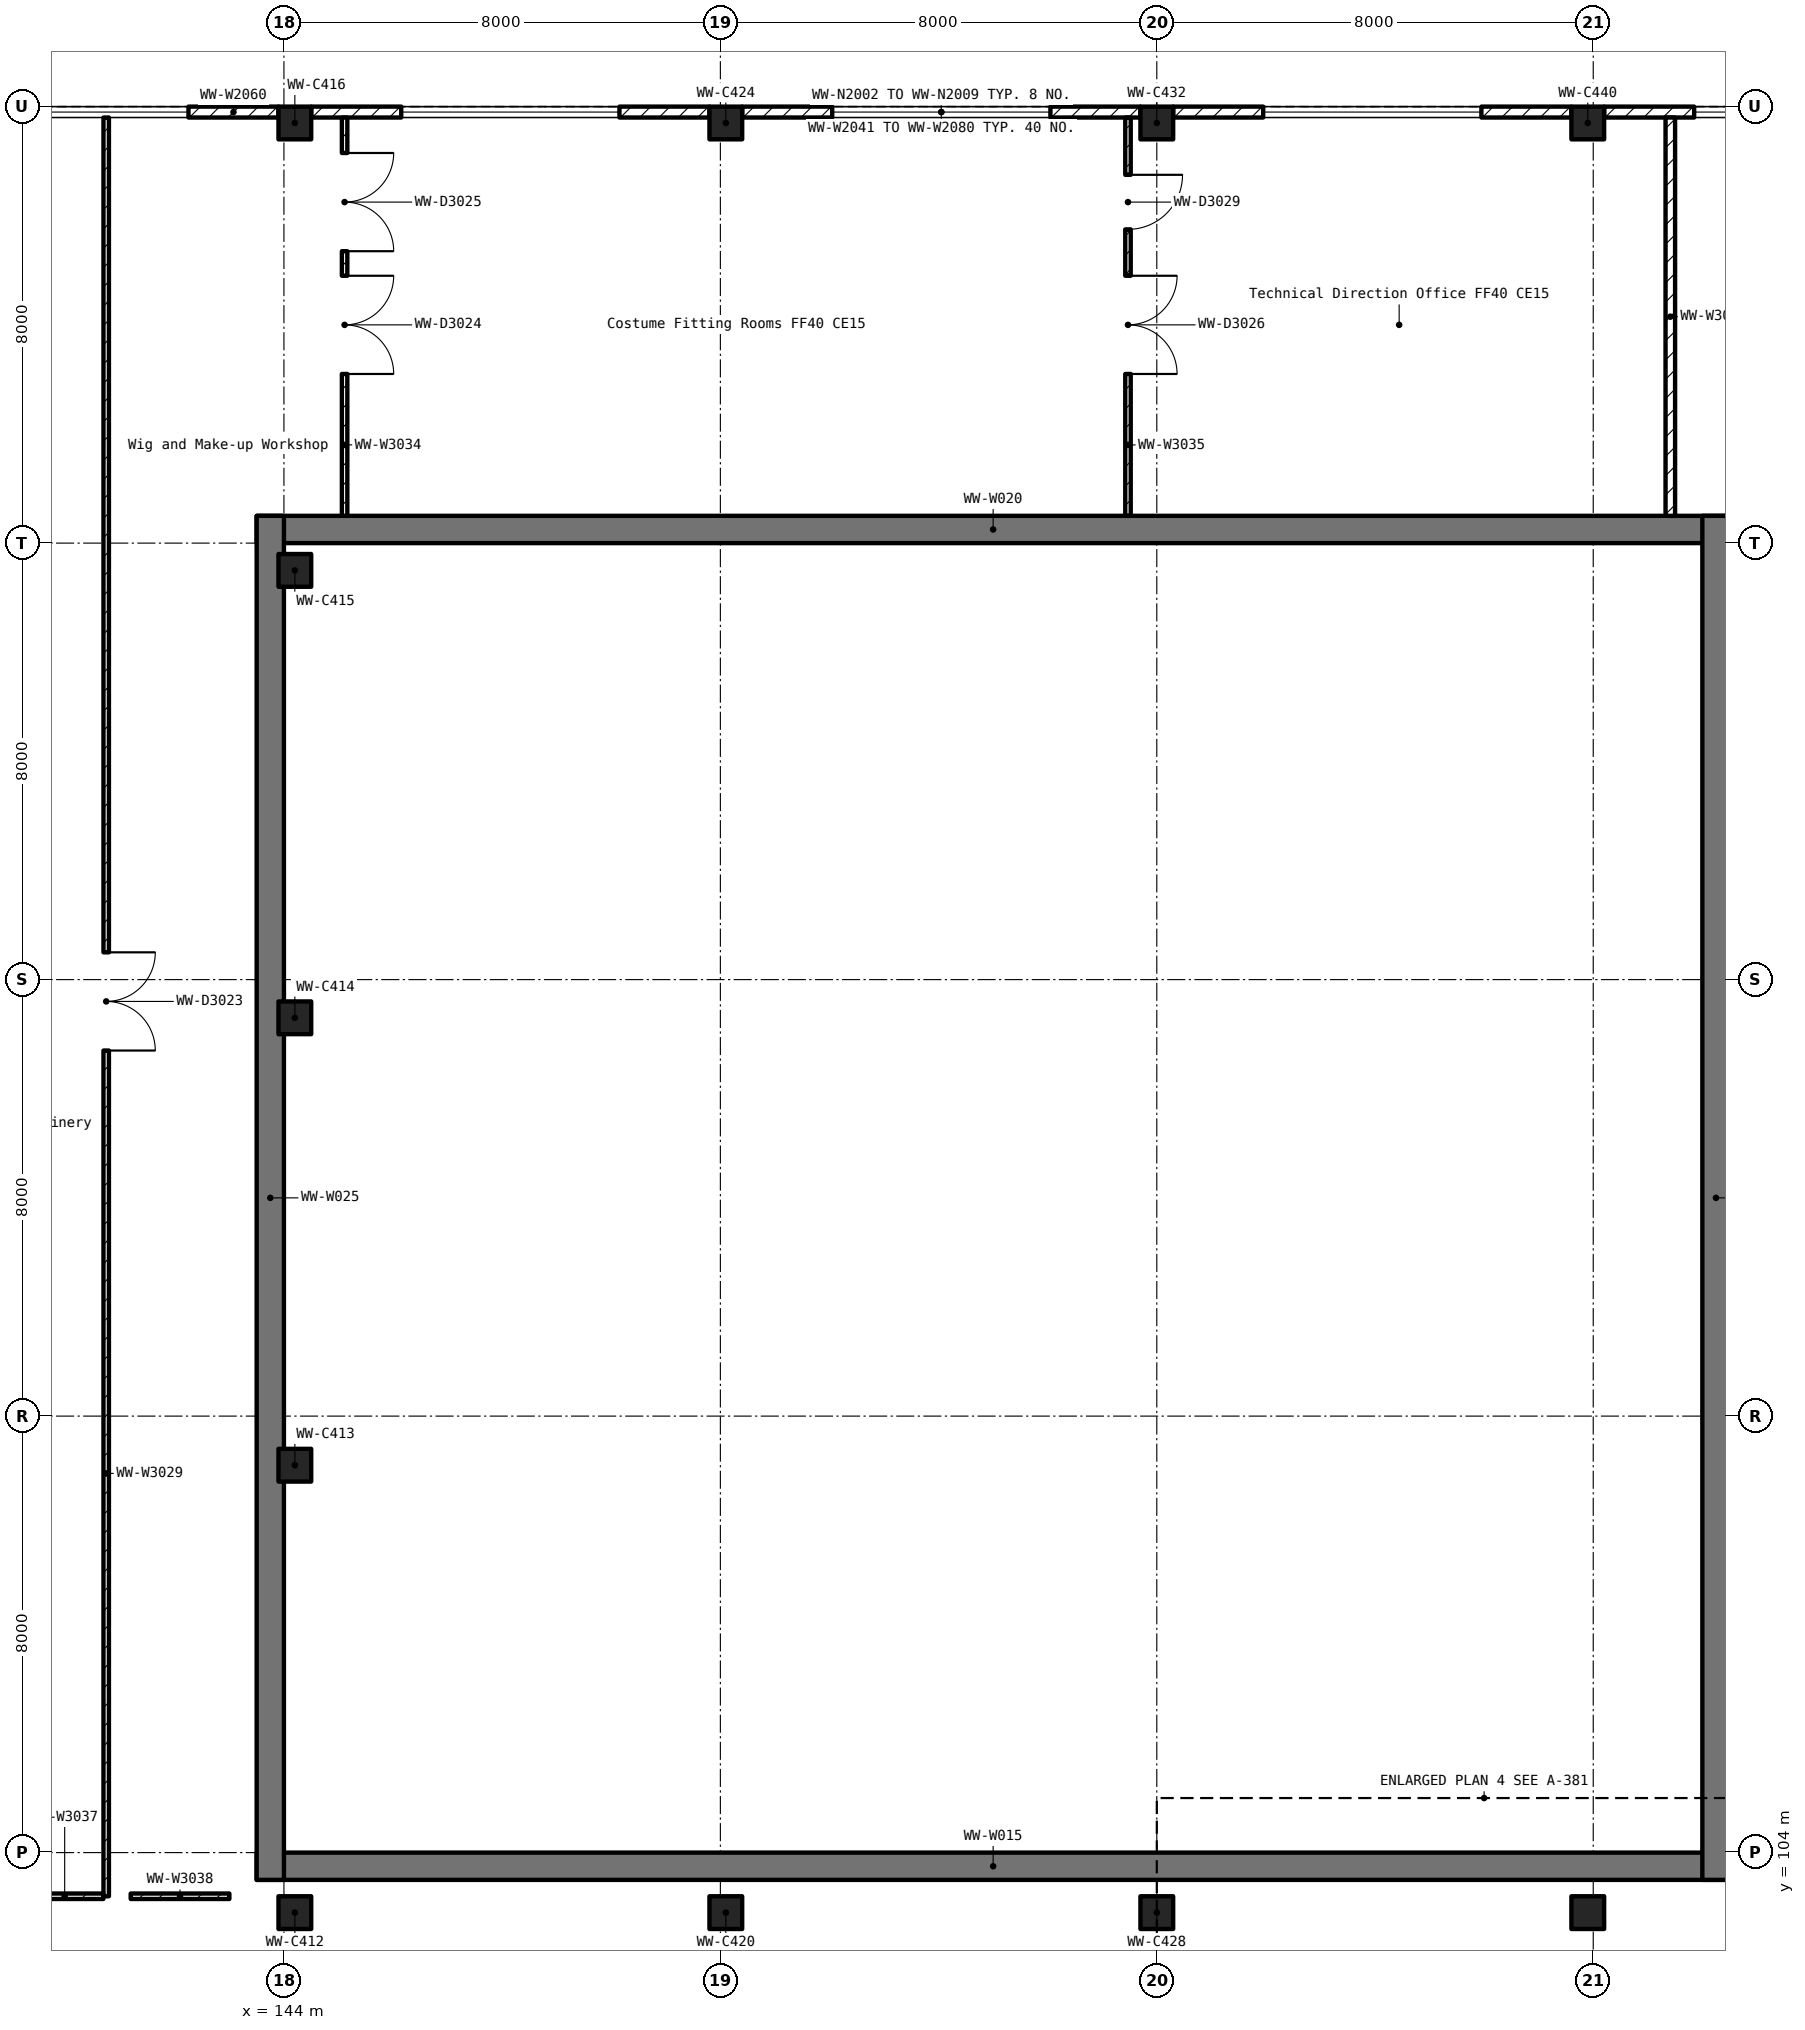
"""IFC4 building model, lengths in metres.
Left out: names, types, materials, properties, quantities, classifications, styles, units other than length and angle.
Written with IfcOpenShell. Run it as: python <this file> out.ifc"""

import sys

from ifc_helpers import new_model, si_unit, direction, frame, frame_2d, origin, origin_2d, place, context, subcontext, project, spatial, rectangle, extrude, element, fill, save


model = new_model("IFC4")
c1 = context("Model", 3, precision=1e-05, world=origin(), true_north=direction((0.0, 1.0)))
c2 = subcontext(c1, "Body", "Model", "MODEL_VIEW")
j1 = project(units=[si_unit("LENGTHUNIT", "METRE"), si_unit("PLANEANGLEUNIT", "RADIAN")], contexts=[c1])
p1 = place(None, origin())
s1 = spatial("IfcSite", under=j1, at=p1, CompositionType="ELEMENT")
p2 = place(p1, origin())
s2 = spatial("IfcBuilding", under=s1, at=p2, CompositionType="ELEMENT")
p3 = place(p2, frame((0.0, 0.0, 6.0)))
s3 = spatial("IfcBuildingStorey", under=s2, at=p3, CompositionType="ELEMENT", Elevation=6.0)
for number, where, z_axis, x_axis in (
    (1, (144.2, 102.9, 0.0), (0.0, 0.0, 1.0), (1.0, 0.0, 0.0)),
    (2, (144.2, 111.1, 0.0), (0.0, 0.0, 1.0), (1.0, 0.0, 0.0)),
    (3, (144.2, 119.3, 0.0), (0.0, 0.0, 1.0), (1.0, 0.0, 0.0)),
    (4, (144.2, 127.5, 0.0), (0.0, 0.0, 1.0), (1.0, 0.0, 0.0)),
    (5, (144.2, 135.7, 0.0), (0.0, 0.0, 1.0), (1.0, 0.0, 0.0)),
    (6, (152.1, 102.9, 0.0), (0.0, 0.0, 1.0), (1.0, 0.0, 0.0)),
    (7, (152.1, 135.7, 0.0), (0.0, 0.0, 1.0), (1.0, 0.0, 0.0)),
    (8, (160.0, 102.9, 0.0), (0.0, 0.0, 1.0), (1.0, 0.0, 0.0)),
    (9, (160.0, 135.7, 0.0), (0.0, 0.0, 1.0), (1.0, 0.0, 0.0)),
    (10, (167.9, 102.9, 0.0), (0.0, 0.0, 1.0), (1.0, 0.0, 0.0)),
    (11, (167.9, 135.7, 0.0), (0.0, 0.0, 1.0), (1.0, 0.0, 0.0)),
):
    element("IfcColumn", number, at=place(p3, frame(where, z_axis=z_axis, x_axis=x_axis)), inside=s3, PredefinedType="COLUMN", context=c2, shape_type="SweptSolid", body=[
        extrude(rectangle(XDim=0.6, YDim=0.6, at=origin_2d()), origin(), (0.0, 0.0, 1.0), 5.5),
    ])
for number, where, z_axis, x_axis in (
    (12, (143.5, 103.75, 0.0), (0.0, 0.0, 1.0), (1.0, 0.0, 0.0)),
    (13, (143.5, 128.25, 0.0), (0.0, 0.0, 1.0), (1.0, 0.0, 0.0)),
):
    element("IfcWall", number, at=place(p3, frame(where, z_axis=z_axis, x_axis=x_axis)), inside=s3, PredefinedType="SHEAR", context=c2, shape_type="SweptSolid", body=[
        extrude(rectangle(XDim=27.0, YDim=0.5, at=frame_2d((13.5, 0.0))), origin(), (0.0, 0.0, 1.0), 5.5),
    ])
for number, where, z_axis, x_axis in (
    (14, (143.75, 103.5, 0.0), (0.0, 0.0, 1.0), (0.0, 1.0, 0.0)),
    (15, (170.25, 103.5, 0.0), (0.0, 0.0, 1.0), (0.0, 1.0, 0.0)),
):
    element("IfcWall", number, at=place(p3, frame(where, z_axis=z_axis, x_axis=x_axis)), inside=s3, PredefinedType="SHEAR", context=c2, shape_type="SweptSolid", body=[
        extrude(rectangle(XDim=25.0, YDim=0.5, at=frame_2d((12.5, 0.0))), origin(), (0.0, 0.0, 1.0), 5.5),
    ])
p4 = place(p3, frame((175.5, 135.9, 0.0), z_axis=(0.0, 0.0, 1.0), x_axis=(-1.0, 0.0, 0.0)))
e16 = element("IfcWall", 16, at=p4, inside=s3, PredefinedType="SOLIDWALL", context=c2, shape_type="SweptSolid", body=[
    extrude(rectangle(XDim=7.3, YDim=0.2, at=frame_2d((3.65, 0.0))), origin(), (0.0, 0.0, 1.0), 4.55),
])
p5 = place(p4, frame((1.65, 0.0, 1.0)))
e17 = element("IfcOpeningElement", 17, at=p5, cuts=e16, PredefinedType="OPENING", context=c2, shape_type="SweptSolid", body=[
    extrude(rectangle(XDim=4.0, YDim=1.8, at=frame_2d((2.0, 0.9))), frame((0.0, 0.112, 0.0), z_axis=(0.0, -1.0, 0.0), x_axis=(1.0, 0.0, 0.0)), (0.0, 0.0, 1.0), 0.224),
])
p6 = place(p3, frame((167.6, 135.9, 0.0), z_axis=(0.0, 0.0, 1.0), x_axis=(-1.0, 0.0, 0.0)))
e18 = element("IfcWall", 18, at=p6, inside=s3, PredefinedType="SOLIDWALL", context=c2, shape_type="SweptSolid", body=[
    extrude(rectangle(XDim=7.3, YDim=0.2, at=frame_2d((3.65, 0.0))), origin(), (0.0, 0.0, 1.0), 4.55),
])
p7 = place(p6, frame((1.65, 0.0, 1.0)))
e19 = element("IfcOpeningElement", 19, at=p7, cuts=e18, PredefinedType="OPENING", context=c2, shape_type="SweptSolid", body=[
    extrude(rectangle(XDim=4.0, YDim=1.8, at=frame_2d((2.0, 0.9))), frame((0.0, 0.112, 0.0), z_axis=(0.0, -1.0, 0.0), x_axis=(1.0, 0.0, 0.0)), (0.0, 0.0, 1.0), 0.224),
])
p8 = place(p3, frame((159.7, 135.9, 0.0), z_axis=(0.0, 0.0, 1.0), x_axis=(-1.0, 0.0, 0.0)))
e20 = element("IfcWall", 20, at=p8, inside=s3, PredefinedType="SOLIDWALL", context=c2, shape_type="SweptSolid", body=[
    extrude(rectangle(XDim=7.3, YDim=0.2, at=frame_2d((3.65, 0.0))), origin(), (0.0, 0.0, 1.0), 4.55),
])
p9 = place(p8, frame((1.65, 0.0, 1.0)))
e21 = element("IfcOpeningElement", 21, at=p9, cuts=e20, PredefinedType="OPENING", context=c2, shape_type="SweptSolid", body=[
    extrude(rectangle(XDim=4.0, YDim=1.8, at=frame_2d((2.0, 0.9))), frame((0.0, 0.112, 0.0), z_axis=(0.0, -1.0, 0.0), x_axis=(1.0, 0.0, 0.0)), (0.0, 0.0, 1.0), 0.224),
])
p10 = place(p3, frame((151.8, 135.9, 0.0), z_axis=(0.0, 0.0, 1.0), x_axis=(-1.0, 0.0, 0.0)))
e22 = element("IfcWall", 22, at=p10, inside=s3, PredefinedType="SOLIDWALL", context=c2, shape_type="SweptSolid", body=[
    extrude(rectangle(XDim=7.3, YDim=0.2, at=frame_2d((3.65, 0.0))), origin(), (0.0, 0.0, 1.0), 4.55),
])
p11 = place(p10, frame((1.65, 0.0, 1.0)))
e23 = element("IfcOpeningElement", 23, at=p11, cuts=e22, PredefinedType="OPENING", context=c2, shape_type="SweptSolid", body=[
    extrude(rectangle(XDim=4.0, YDim=1.8, at=frame_2d((2.0, 0.9))), frame((0.0, 0.112, 0.0), z_axis=(0.0, -1.0, 0.0), x_axis=(1.0, 0.0, 0.0)), (0.0, 0.0, 1.0), 0.224),
])
p12 = place(p3, frame((143.9, 135.9, 0.0), z_axis=(0.0, 0.0, 1.0), x_axis=(-1.0, 0.0, 0.0)))
e24 = element("IfcWall", 24, at=p12, inside=s3, PredefinedType="SOLIDWALL", context=c2, shape_type="SweptSolid", body=[
    extrude(rectangle(XDim=7.3, YDim=0.2, at=frame_2d((3.65, 0.0))), origin(), (0.0, 0.0, 1.0), 4.55),
])
p13 = place(p12, frame((1.65, 0.0, 1.0)))
e25 = element("IfcOpeningElement", 25, at=p13, cuts=e24, PredefinedType="OPENING", context=c2, shape_type="SweptSolid", body=[
    extrude(rectangle(XDim=4.0, YDim=1.8, at=frame_2d((2.0, 0.9))), frame((0.0, 0.112, 0.0), z_axis=(0.0, -1.0, 0.0), x_axis=(1.0, 0.0, 0.0)), (0.0, 0.0, 1.0), 0.224),
])
p14 = place(p3, frame((140.742, 135.8, 0.0), z_axis=(0.0, 0.0, 1.0), x_axis=(0.0, -1.0, 0.0)))
e26 = element("IfcWall", 26, at=p14, inside=s3, PredefinedType="PARTITIONING", context=c2, shape_type="SweptSolid", body=[
    extrude(rectangle(XDim=32.6, YDim=0.1, at=frame_2d((16.3, 0.0))), origin(), (0.0, 0.0, 1.0), 4.45),
])
p15 = place(p14, frame((15.3, 0.0, 0.0)))
e27 = element("IfcOpeningElement", 27, at=p15, cuts=e26, PredefinedType="OPENING", context=c2, shape_type="SweptSolid", body=[
    extrude(rectangle(XDim=1.8, YDim=2.1, at=frame_2d((0.9, 1.05))), frame((0.0, 0.062, 0.0), z_axis=(0.0, -1.0, 0.0), x_axis=(1.0, 0.0, 0.0)), (0.0, 0.0, 1.0), 0.124),
])
p16 = place(p3, frame((145.112, 135.8, 0.0), z_axis=(0.0, 0.0, 1.0), x_axis=(0.0, -1.0, 0.0)))
e28 = element("IfcWall", 28, at=p16, inside=s3, PredefinedType="PARTITIONING", context=c2, shape_type="SweptSolid", body=[
    extrude(rectangle(XDim=7.3, YDim=0.1, at=frame_2d((3.65, 0.0))), origin(), (0.0, 0.0, 1.0), 4.45),
])
p17 = place(p16, frame((2.9, 0.0, 0.0)))
e29 = element("IfcOpeningElement", 29, at=p17, cuts=e28, PredefinedType="OPENING", context=c2, shape_type="SweptSolid", body=[
    extrude(rectangle(XDim=1.8, YDim=2.1, at=frame_2d((0.9, 1.05))), frame((0.0, 0.062, 0.0), z_axis=(0.0, -1.0, 0.0), x_axis=(1.0, 0.0, 0.0)), (0.0, 0.0, 1.0), 0.124),
])
p18 = place(p16, frame((0.65, 0.0, 0.0)))
e30 = element("IfcOpeningElement", 30, at=p18, cuts=e28, PredefinedType="OPENING", context=c2, shape_type="SweptSolid", body=[
    extrude(rectangle(XDim=1.8, YDim=2.1, at=frame_2d((0.9, 1.05))), frame((0.0, 0.062, 0.0), z_axis=(0.0, -1.0, 0.0), x_axis=(1.0, 0.0, 0.0)), (0.0, 0.0, 1.0), 0.124),
])
p19 = place(p3, frame((159.472, 135.8, 0.0), z_axis=(0.0, 0.0, 1.0), x_axis=(0.0, -1.0, 0.0)))
e31 = element("IfcWall", 31, at=p19, inside=s3, PredefinedType="PARTITIONING", context=c2, shape_type="SweptSolid", body=[
    extrude(rectangle(XDim=7.3, YDim=0.1, at=frame_2d((3.65, 0.0))), origin(), (0.0, 0.0, 1.0), 4.45),
])
p20 = place(p19, frame((2.9, 0.0, 0.0)))
e32 = element("IfcOpeningElement", 32, at=p20, cuts=e31, PredefinedType="OPENING", context=c2, shape_type="SweptSolid", body=[
    extrude(rectangle(XDim=1.8, YDim=2.1, at=frame_2d((0.9, 1.05))), frame((0.0, 0.062, 0.0), z_axis=(0.0, -1.0, 0.0), x_axis=(1.0, 0.0, 0.0)), (0.0, 0.0, 1.0), 0.124),
])
p21 = place(p19, frame((1.05, 0.0, 0.0)))
e33 = element("IfcOpeningElement", 33, at=p21, cuts=e31, PredefinedType="OPENING", context=c2, shape_type="SweptSolid", body=[
    extrude(rectangle(XDim=1.0, YDim=2.1, at=frame_2d((0.5, 1.05))), frame((0.0, 0.062, 0.0), z_axis=(0.0, -1.0, 0.0), x_axis=(1.0, 0.0, 0.0)), (0.0, 0.0, 1.0), 0.124),
])
p22 = place(p3, frame((169.413, 128.5, 0.0), z_axis=(0.0, 0.0, 1.0), x_axis=(0.0, 1.0, 0.0)))
e34 = element("IfcWall", 34, at=p22, inside=s3, PredefinedType="PARTITIONING", context=c2, shape_type="SweptSolid", body=[
    extrude(rectangle(XDim=7.3, YDim=0.175, at=frame_2d((3.65, 0.0))), origin(), (0.0, 0.0, 1.0), 4.45),
])
p23 = place(p3, frame((140.691, 103.2, 0.0), z_axis=(0.0, 0.0, 1.0), x_axis=(-1.0, 0.0, 0.0)))
e35 = element("IfcWall", 35, at=p23, inside=s3, PredefinedType="PARTITIONING", context=c2, shape_type="SweptSolid", body=[
    extrude(rectangle(XDim=4.09, YDim=0.1, at=frame_2d((2.045, 0.0))), origin(), (0.0, 0.0, 1.0), 4.45),
])
p24 = place(p23, frame((1.42, 0.0, 0.0)))
e36 = element("IfcOpeningElement", 36, at=p24, cuts=e35, PredefinedType="OPENING", context=c2, shape_type="SweptSolid", body=[
    extrude(rectangle(XDim=1.8, YDim=2.1, at=frame_2d((0.9, 1.05))), frame((0.0, 0.062, 0.0), z_axis=(0.0, -1.0, 0.0), x_axis=(1.0, 0.0, 0.0)), (0.0, 0.0, 1.0), 0.124),
])
p25 = place(p3, frame((143.0, 103.2, 0.0), z_axis=(0.0, 0.0, 1.0), x_axis=(-1.0, 0.0, 0.0)))
e37 = element("IfcWall", 37, at=p25, inside=s3, PredefinedType="PARTITIONING", context=c2, shape_type="SweptSolid", body=[
    extrude(rectangle(XDim=1.809, YDim=0.1, at=frame_2d((0.905, 0.0))), origin(), (0.0, 0.0, 1.0), 4.45),
])
p26 = place(p5, origin())
e38 = element("IfcWindow", 38, at=p26, inside=s3, PartitioningType="DOUBLE_PANEL_VERTICAL", PredefinedType="WINDOW", context=c2, shape_type="SweptSolid", body=[
    extrude(rectangle(XDim=4.0, YDim=1.8, at=frame_2d((2.0, 0.9))), frame((0.0, 0.03, 0.0), z_axis=(0.0, -1.0, 0.0), x_axis=(1.0, 0.0, 0.0)), (0.0, 0.0, 1.0), 0.06),
])
fill(e17, e38)
p27 = place(p7, origin())
e39 = element("IfcWindow", 39, at=p27, inside=s3, PartitioningType="DOUBLE_PANEL_VERTICAL", PredefinedType="WINDOW", context=c2, shape_type="SweptSolid", body=[
    extrude(rectangle(XDim=4.0, YDim=1.8, at=frame_2d((2.0, 0.9))), frame((0.0, 0.03, 0.0), z_axis=(0.0, -1.0, 0.0), x_axis=(1.0, 0.0, 0.0)), (0.0, 0.0, 1.0), 0.06),
])
fill(e19, e39)
p28 = place(p9, origin())
e40 = element("IfcWindow", 40, at=p28, inside=s3, PartitioningType="DOUBLE_PANEL_VERTICAL", PredefinedType="WINDOW", context=c2, shape_type="SweptSolid", body=[
    extrude(rectangle(XDim=4.0, YDim=1.8, at=frame_2d((2.0, 0.9))), frame((0.0, 0.03, 0.0), z_axis=(0.0, -1.0, 0.0), x_axis=(1.0, 0.0, 0.0)), (0.0, 0.0, 1.0), 0.06),
])
fill(e21, e40)
p29 = place(p11, origin())
e41 = element("IfcWindow", 41, at=p29, inside=s3, PartitioningType="DOUBLE_PANEL_VERTICAL", PredefinedType="WINDOW", context=c2, shape_type="SweptSolid", body=[
    extrude(rectangle(XDim=4.0, YDim=1.8, at=frame_2d((2.0, 0.9))), frame((0.0, 0.03, 0.0), z_axis=(0.0, -1.0, 0.0), x_axis=(1.0, 0.0, 0.0)), (0.0, 0.0, 1.0), 0.06),
])
fill(e23, e41)
p30 = place(p13, origin())
e42 = element("IfcWindow", 42, at=p30, inside=s3, PartitioningType="DOUBLE_PANEL_VERTICAL", PredefinedType="WINDOW", context=c2, shape_type="SweptSolid", body=[
    extrude(rectangle(XDim=4.0, YDim=1.8, at=frame_2d((2.0, 0.9))), frame((0.0, 0.03, 0.0), z_axis=(0.0, -1.0, 0.0), x_axis=(1.0, 0.0, 0.0)), (0.0, 0.0, 1.0), 0.06),
])
fill(e25, e42)
p31 = place(p15, origin())
e43 = element("IfcDoor", 43, at=p31, inside=s3, OperationType="DOUBLE_DOOR_SINGLE_SWING", PredefinedType="DOOR", context=c2, shape_type="SweptSolid", body=[
    extrude(rectangle(XDim=1.8, YDim=2.1, at=frame_2d((0.9, 1.05))), frame((0.0, 0.025, 0.0), z_axis=(0.0, -1.0, 0.0), x_axis=(1.0, 0.0, 0.0)), (0.0, 0.0, 1.0), 0.05),
])
fill(e27, e43)
p32 = place(p17, origin())
e44 = element("IfcDoor", 44, at=p32, inside=s3, OperationType="DOUBLE_DOOR_SINGLE_SWING", PredefinedType="DOOR", context=c2, shape_type="SweptSolid", body=[
    extrude(rectangle(XDim=1.8, YDim=2.1, at=frame_2d((0.9, 1.05))), frame((0.0, 0.025, 0.0), z_axis=(0.0, -1.0, 0.0), x_axis=(1.0, 0.0, 0.0)), (0.0, 0.0, 1.0), 0.05),
])
fill(e29, e44)
p33 = place(p18, origin())
e45 = element("IfcDoor", 45, at=p33, inside=s3, OperationType="DOUBLE_DOOR_SINGLE_SWING", PredefinedType="DOOR", context=c2, shape_type="SweptSolid", body=[
    extrude(rectangle(XDim=1.8, YDim=2.1, at=frame_2d((0.9, 1.05))), frame((0.0, 0.025, 0.0), z_axis=(0.0, -1.0, 0.0), x_axis=(1.0, 0.0, 0.0)), (0.0, 0.0, 1.0), 0.05),
])
fill(e30, e45)
p34 = place(p20, origin())
e46 = element("IfcDoor", 46, at=p34, inside=s3, OperationType="DOUBLE_DOOR_SINGLE_SWING", PredefinedType="DOOR", context=c2, shape_type="SweptSolid", body=[
    extrude(rectangle(XDim=1.8, YDim=2.1, at=frame_2d((0.9, 1.05))), frame((0.0, 0.025, 0.0), z_axis=(0.0, -1.0, 0.0), x_axis=(1.0, 0.0, 0.0)), (0.0, 0.0, 1.0), 0.05),
])
fill(e32, e46)
p35 = place(p21, origin())
e47 = element("IfcDoor", 47, at=p35, inside=s3, OperationType="SINGLE_SWING_LEFT", PredefinedType="DOOR", context=c2, shape_type="SweptSolid", body=[
    extrude(rectangle(XDim=1.0, YDim=2.1, at=frame_2d((0.5, 1.05))), frame((0.0, 0.025, 0.0), z_axis=(0.0, -1.0, 0.0), x_axis=(1.0, 0.0, 0.0)), (0.0, 0.0, 1.0), 0.05),
])
fill(e33, e47)
save(model, sys.argv[1])
